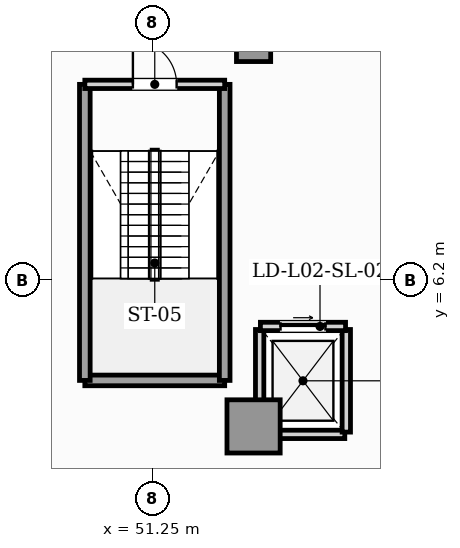
"""IFC4 building model, lengths in metres.
Left out: names, types, materials, properties, quantities, classifications, styles, units other than length and angle.
Written with IfcOpenShell. Run it as: python <this file> out.ifc"""

import sys

from ifc_helpers import new_model, si_unit, direction, frame, frame_2d, origin, origin_2d, place, context, subcontext, project, spatial, rectangle, hollow_rectangle, extrude, element, fill, save


model = new_model("IFC4")
c1 = context("Model", 3, precision=1e-05, world=origin(), true_north=direction((0.0, 1.0)))
c2 = subcontext(c1, "Body", "Model", "MODEL_VIEW")
j1 = project(units=[si_unit("LENGTHUNIT", "METRE"), si_unit("PLANEANGLEUNIT", "RADIAN")], contexts=[c1])
p1 = place(None, origin())
s1 = spatial("IfcSite", under=j1, at=p1, CompositionType="ELEMENT")
p2 = place(p1, origin())
s2 = spatial("IfcBuilding", under=s1, at=p2, CompositionType="ELEMENT")
p3 = place(p2, frame((0.0, 0.0, 10.2)))
s3 = spatial("IfcBuildingStorey", under=s2, at=p3, CompositionType="ELEMENT", Elevation=10.2)
p4 = place(p3, frame((53.9, 2.35, 0.0), z_axis=(0.0, 0.0, 1.0), x_axis=(1.0, 0.0, 0.0)))
e1 = element("IfcColumn", 1, at=p4, inside=s3, PredefinedType="USERDEFINED", context=c2, shape_type="SweptSolid", body=[
    extrude(hollow_rectangle(XDim=1.4, YDim=1.4, WallThickness=0.08, at=origin_2d()), origin(), (0.0, 0.0, 1.0), 4.8),
])
p5 = place(p3, frame((53.9, 12.4, 0.0), z_axis=(0.0, 0.0, 1.0), x_axis=(1.0, 0.0, 0.0)))
e2 = element("IfcColumn", 2, at=p5, inside=s3, PredefinedType="COLUMN", context=c2, shape_type="SweptSolid", body=[
    extrude(rectangle(XDim=0.9, YDim=0.9, at=origin_2d()), origin(), (0.0, 0.0, 1.0), 4.8),
])
p6 = place(p3, frame((54.1, 2.14, 0.0), z_axis=(0.0, 0.0, 1.0), x_axis=(1.0, 0.0, 0.0)))
e3 = element("IfcWall", 3, at=p6, inside=s3, PredefinedType="SOLIDWALL", context=c2, shape_type="SweptSolid", body=[
    extrude(rectangle(XDim=2.2, YDim=0.22, at=frame_2d((1.1, 0.0))), origin(), (0.0, 0.0, 1.0), 4.52),
])
p7 = place(p3, frame((54.06, 2.2, 0.0), z_axis=(0.0, 0.0, 1.0), x_axis=(0.0, 1.0, 0.0)))
e4 = element("IfcWall", 4, at=p7, inside=s3, PredefinedType="SOLIDWALL", context=c2, shape_type="SweptSolid", body=[
    extrude(rectangle(XDim=2.7, YDim=0.22, at=frame_2d((1.35, 0.0))), origin(), (0.0, 0.0, 1.0), 3.987),
])
p8 = place(p3, frame((56.34, 2.2, 0.0), z_axis=(0.0, 0.0, 1.0), x_axis=(0.0, 1.0, 0.0)))
e5 = element("IfcWall", 5, at=p8, inside=s3, PredefinedType="SOLIDWALL", context=c2, shape_type="SweptSolid", body=[
    extrude(rectangle(XDim=2.7, YDim=0.22, at=frame_2d((1.35, 0.0))), origin(), (0.0, 0.0, 1.0), 4.52),
])
p9 = place(p3, frame((54.08, 4.98, 0.0), z_axis=(0.0, 0.0, 1.0), x_axis=(1.0, 0.0, 0.0)))
e6 = element("IfcWall", 6, at=p9, inside=s3, PredefinedType="SOLIDWALL", context=c2, shape_type="SweptSolid", body=[
    extrude(rectangle(XDim=2.24, YDim=0.22, at=frame_2d((1.12, 0.0))), origin(), (0.0, 0.0, 1.0), 4.52),
])
p10 = place(p9, frame((0.53, 0.0, 0.0)))
e7 = element("IfcOpeningElement", 7, at=p10, cuts=e6, PredefinedType="OPENING", context=c2, shape_type="SweptSolid", body=[
    extrude(rectangle(XDim=1.18, YDim=2.2, at=frame_2d((0.59, 1.1))), frame((0.0, 0.12, 0.0), z_axis=(0.0, -1.0, 0.0), x_axis=(1.0, 0.0, 0.0)), (0.0, 0.0, 1.0), 0.24),
])
p11 = place(p3, frame((49.46, 3.56, 0.0), z_axis=(0.0, 0.0, 1.0), x_axis=(1.0, 0.0, 0.0)))
e8 = element("IfcWall", 8, at=p11, inside=s3, PredefinedType="SHEAR", context=c2, shape_type="SweptSolid", body=[
    extrude(rectangle(XDim=3.68, YDim=0.28, at=frame_2d((1.84, 0.0))), origin(), (0.0, 0.0, 1.0), 4.52),
])
for number, where, z_axis, x_axis in (
    (9, (49.46, 3.56, 0.0), (0.0, 0.0, 1.0), (0.0, 1.0, 0.0)),
    (10, (53.14, 3.56, 0.0), (0.0, 0.0, 1.0), (0.0, 1.0, 0.0)),
):
    element("IfcWall", number, at=place(p3, frame(where, z_axis=z_axis, x_axis=x_axis)), inside=s3, PredefinedType="SHEAR", context=c2, shape_type="SweptSolid", body=[
        extrude(rectangle(XDim=7.79, YDim=0.28, at=frame_2d((3.895, 0.0))), origin(), (0.0, 0.0, 1.0), 4.52),
    ])
p12 = place(p3, frame((49.46, 11.35, 0.0), z_axis=(0.0, 0.0, 1.0), x_axis=(1.0, 0.0, 0.0)))
e11 = element("IfcWall", 11, at=p12, inside=s3, PredefinedType="SOLIDWALL", context=c2, shape_type="SweptSolid", body=[
    extrude(rectangle(XDim=3.68, YDim=0.22, at=frame_2d((1.84, 0.0))), origin(), (0.0, 0.0, 1.0), 4.52),
])
p13 = place(p12, frame((1.265, 0.0, 0.0)))
e12 = element("IfcOpeningElement", 12, at=p13, cuts=e11, PredefinedType="OPENING", context=c2, shape_type="SweptSolid", body=[
    extrude(rectangle(XDim=1.15, YDim=2.2, at=frame_2d((0.575, 1.1))), frame((0.0, 0.12, 0.0), z_axis=(0.0, -1.0, 0.0), x_axis=(1.0, 0.0, 0.0)), (0.0, 0.0, 1.0), 0.24),
])
p14 = place(p10, origin())
e13 = element("IfcDoor", 13, at=p14, inside=s3, OperationType="SLIDING_TO_RIGHT", PredefinedType="DOOR", context=c2, shape_type="SweptSolid", body=[
    extrude(rectangle(XDim=1.18, YDim=2.2, at=frame_2d((0.59, 1.1))), frame((0.0, 0.025, 0.0), z_axis=(0.0, -1.0, 0.0), x_axis=(1.0, 0.0, 0.0)), (0.0, 0.0, 1.0), 0.05),
])
fill(e7, e13)
p15 = place(p13, origin())
e14 = element("IfcDoor", 14, at=p15, inside=s3, OperationType="SINGLE_SWING_LEFT", PredefinedType="DOOR", context=c2, shape_type="SweptSolid", body=[
    extrude(rectangle(XDim=1.15, YDim=2.2, at=frame_2d((0.575, 1.1))), frame((0.0, 0.025, 0.0), z_axis=(0.0, -1.0, 0.0), x_axis=(1.0, 0.0, 0.0)), (0.0, 0.0, 1.0), 0.05),
])
fill(e12, e14)
save(model, sys.argv[1])
